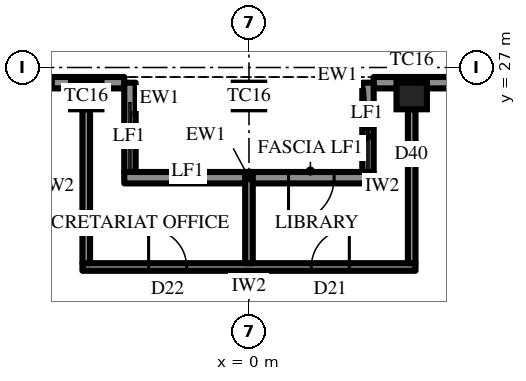
"""IFC4 building model, lengths in metres.
Left out: names, types, materials, properties, quantities, classifications, styles, units other than length and angle.
Written with IfcOpenShell. Run it as: python <this file> out.ifc"""

import sys

from ifc_helpers import new_model, si_unit, direction, frame, frame_2d, origin, origin_2d, place, context, subcontext, project, spatial, rectangle, extrude, element, fill, save


model = new_model("IFC4")
c1 = context("Model", 3, precision=1e-05, world=origin(), true_north=direction((0.0, 1.0)))
c2 = subcontext(c1, "Body", "Model", "MODEL_VIEW")
j1 = project(units=[si_unit("LENGTHUNIT", "METRE"), si_unit("PLANEANGLEUNIT", "RADIAN")], contexts=[c1])
p1 = place(None, origin())
s1 = spatial("IfcSite", under=j1, at=p1, CompositionType="ELEMENT")
p2 = place(p1, origin())
s2 = spatial("IfcBuilding", under=s1, at=p2, CompositionType="ELEMENT")
p3 = place(p2, frame((0.0, 0.0, 378.7)))
s3 = spatial("IfcBuildingStorey", under=s2, at=p3, CompositionType="ELEMENT", Elevation=378.7)
for number, where, z_axis, x_axis in (
    (1, (4.282, 26.25, 0.0), (0.0, 0.0, 1.0), (-1.0, 0.0, 0.0)),
    (2, (0.0, 26.25, 0.0), (0.0, 0.0, 1.0), (-1.0, 0.0, 0.0)),
    (3, (-4.282, 26.25, 0.0), (0.0, 0.0, 1.0), (-1.0, 0.0, 0.0)),
):
    element("IfcColumn", number, at=place(p3, frame(where, z_axis=z_axis, x_axis=x_axis)), inside=s3, PredefinedType="COLUMN", context=c2, shape_type="SweptSolid", body=[
        extrude(rectangle(XDim=0.8, YDim=0.7, at=origin_2d()), origin(), (0.0, 0.0, 1.0), 4.2),
    ])
p4 = place(p3, frame((12.846, 26.6, 0.0), z_axis=(0.0, 0.0, 1.0), x_axis=(-1.0, 0.0, 0.0)))
e4 = element("IfcWall", 4, at=p4, inside=s3, PredefinedType="SOLIDWALL", context=c2, shape_type="SweptSolid", body=[
    extrude(rectangle(XDim=9.564, YDim=0.3, at=frame_2d((4.782, 0.0))), origin(), (0.0, 0.0, 1.0), 2.9),
])
p5 = place(p4, frame((0.866, 0.0, 0.6)))
e5 = element("IfcOpeningElement", 5, at=p5, cuts=e4, PredefinedType="OPENING", context=c2, shape_type="SweptSolid", body=[
    extrude(rectangle(XDim=2.55, YDim=2.05, at=frame_2d((1.275, 1.025))), frame((0.0, 0.16, 0.0), z_axis=(0.0, -1.0, 0.0), x_axis=(1.0, 0.0, 0.0)), (0.0, 0.0, 1.0), 0.32),
])
p6 = place(p4, frame((5.823, 0.0, 0.0)))
e6 = element("IfcOpeningElement", 6, at=p6, cuts=e4, PredefinedType="OPENING", context=c2, shape_type="SweptSolid", body=[
    extrude(rectangle(XDim=1.2, YDim=2.4, at=frame_2d((0.6, 1.2))), frame((0.0, 0.16, 0.0), z_axis=(0.0, -1.0, 0.0), x_axis=(1.0, 0.0, 0.0)), (0.0, 0.0, 1.0), 0.32),
])
p7 = place(p3, frame((-3.282, 26.6, 0.0), z_axis=(0.0, 0.0, 1.0), x_axis=(-1.0, 0.0, 0.0)))
e7 = element("IfcWall", 7, at=p7, inside=s3, PredefinedType="SOLIDWALL", context=c2, shape_type="SweptSolid", body=[
    extrude(rectangle(XDim=9.564, YDim=0.3, at=frame_2d((4.782, 0.0))), origin(), (0.0, 0.0, 1.0), 2.9),
])
p8 = place(p7, frame((1.866, 0.0, 0.6)))
e8 = element("IfcOpeningElement", 8, at=p8, cuts=e7, PredefinedType="OPENING", context=c2, shape_type="SweptSolid", body=[
    extrude(rectangle(XDim=2.55, YDim=2.05, at=frame_2d((1.275, 1.025))), frame((0.0, 0.16, 0.0), z_axis=(0.0, -1.0, 0.0), x_axis=(1.0, 0.0, 0.0)), (0.0, 0.0, 1.0), 0.32),
])
p9 = place(p7, frame((6.148, 0.0, 0.6)))
e9 = element("IfcOpeningElement", 9, at=p9, cuts=e7, PredefinedType="OPENING", context=c2, shape_type="SweptSolid", body=[
    extrude(rectangle(XDim=2.55, YDim=2.05, at=frame_2d((1.275, 1.025))), frame((0.0, 0.16, 0.0), z_axis=(0.0, -1.0, 0.0), x_axis=(1.0, 0.0, 0.0)), (0.0, 0.0, 1.0), 0.32),
])
for number, where, z_axis, x_axis in (
    (10, (3.132, 26.6, 0.0), (0.0, 0.0, 1.0), (0.0, -1.0, 0.0)),
    (11, (-3.132, 26.6, 0.0), (0.0, 0.0, 1.0), (0.0, -1.0, 0.0)),
):
    element("IfcWall", number, at=place(p3, frame(where, z_axis=z_axis, x_axis=x_axis)), inside=s3, PredefinedType="SOLIDWALL", context=c2, shape_type="SweptSolid", body=[
        extrude(rectangle(XDim=2.35, YDim=0.3, at=frame_2d((1.175, 0.0))), origin(), (0.0, 0.0, 1.0), 2.9),
    ])
p10 = place(p3, frame((3.282, 24.1, 0.0), z_axis=(0.0, 0.0, 1.0), x_axis=(-1.0, 0.0, 0.0)))
e12 = element("IfcWall", 12, at=p10, inside=s3, PredefinedType="SOLIDWALL", context=c2, shape_type="SweptSolid", body=[
    extrude(rectangle(XDim=6.564, YDim=0.3, at=frame_2d((3.282, 0.0))), origin(), (0.0, 0.0, 1.0), 2.9),
])
p11 = place(p10, frame((1.041, 0.0, 0.0)))
e13 = element("IfcOpeningElement", 13, at=p11, cuts=e12, PredefinedType="OPENING", context=c2, shape_type="SweptSolid", body=[
    extrude(rectangle(XDim=1.2, YDim=2.4, at=frame_2d((0.6, 1.2))), frame((0.0, 0.16, 0.0), z_axis=(0.0, -1.0, 0.0), x_axis=(1.0, 0.0, 0.0)), (0.0, 0.0, 1.0), 0.32),
])
p12 = place(p3, frame((4.382, 21.75, 0.0), z_axis=(0.0, 0.0, 1.0), x_axis=(-1.0, 0.0, 0.0)))
e14 = element("IfcWall", 14, at=p12, inside=s3, PredefinedType="PARTITIONING", context=c2, shape_type="SweptSolid", body=[
    extrude(rectangle(XDim=8.764, YDim=0.2, at=frame_2d((4.382, 0.0))), origin(), (0.0, 0.0, 1.0), 4.0),
])
p13 = place(p12, frame((1.741, 0.0, 0.0)))
e15 = element("IfcOpeningElement", 15, at=p13, cuts=e14, PredefinedType="OPENING", context=c2, shape_type="SweptSolid", body=[
    extrude(rectangle(XDim=1.0, YDim=2.2, at=frame_2d((0.5, 1.1))), frame((0.0, 0.11, 0.0), z_axis=(0.0, -1.0, 0.0), x_axis=(1.0, 0.0, 0.0)), (0.0, 0.0, 1.0), 0.22),
])
p14 = place(p12, frame((6.023, 0.0, 0.0)))
e16 = element("IfcOpeningElement", 16, at=p14, cuts=e14, PredefinedType="OPENING", context=c2, shape_type="SweptSolid", body=[
    extrude(rectangle(XDim=1.0, YDim=2.2, at=frame_2d((0.5, 1.1))), frame((0.0, 0.11, 0.0), z_axis=(0.0, -1.0, 0.0), x_axis=(1.0, 0.0, 0.0)), (0.0, 0.0, 1.0), 0.22),
])
p15 = place(p3, frame((4.282, 21.85, 0.0), z_axis=(0.0, 0.0, 1.0), x_axis=(0.0, 1.0, 0.0)))
e17 = element("IfcWall", 17, at=p15, inside=s3, PredefinedType="PARTITIONING", context=c2, shape_type="SweptSolid", body=[
    extrude(rectangle(XDim=4.05, YDim=0.2, at=frame_2d((2.025, 0.0))), origin(), (0.0, 0.0, 1.0), 2.992),
])
p16 = place(p3, frame((0.0, 21.85, 0.0), z_axis=(0.0, 0.0, 1.0), x_axis=(0.0, 1.0, 0.0)))
e18 = element("IfcWall", 18, at=p16, inside=s3, PredefinedType="PARTITIONING", context=c2, shape_type="SweptSolid", body=[
    extrude(rectangle(XDim=2.401, YDim=0.2, at=frame_2d((1.2, 0.0))), origin(), (0.0, 0.0, 1.0), 2.992),
])
p17 = place(p3, frame((-4.282, 21.85, 0.0), z_axis=(0.0, 0.0, 1.0), x_axis=(0.0, 1.0, 0.0)))
e19 = element("IfcWall", 19, at=p17, inside=s3, PredefinedType="PARTITIONING", context=c2, shape_type="SweptSolid", body=[
    extrude(rectangle(XDim=4.05, YDim=0.2, at=frame_2d((2.025, 0.0))), origin(), (0.0, 0.0, 1.0), 2.992),
])
p18 = place(p8, origin())
e20 = element("IfcWindow", 20, at=p18, inside=s3, PartitioningType="SINGLE_PANEL", PredefinedType="WINDOW", context=c2, shape_type="SweptSolid", body=[
    extrude(rectangle(XDim=2.55, YDim=2.05, at=frame_2d((1.275, 1.025))), frame((0.0, 0.03, 0.0), z_axis=(0.0, -1.0, 0.0), x_axis=(1.0, 0.0, 0.0)), (0.0, 0.0, 1.0), 0.06),
])
fill(e8, e20)
p19 = place(p11, origin())
e21 = element("IfcDoor", 21, at=p19, inside=s3, OperationType="SINGLE_SWING_LEFT", PredefinedType="DOOR", context=c2, shape_type="SweptSolid", body=[
    extrude(rectangle(XDim=1.2, YDim=2.4, at=frame_2d((0.6, 1.2))), frame((0.0, 0.025, 0.0), z_axis=(0.0, -1.0, 0.0), x_axis=(1.0, 0.0, 0.0)), (0.0, 0.0, 1.0), 0.05),
])
fill(e13, e21)
p20 = place(p13, frame((1.0, 0.0, 0.0), z_axis=(0.0, 0.0, 1.0), x_axis=(-1.0, 0.0, 0.0)))
e22 = element("IfcDoor", 22, at=p20, inside=s3, OperationType="SINGLE_SWING_LEFT", PredefinedType="DOOR", context=c2, shape_type="SweptSolid", body=[
    extrude(rectangle(XDim=1.0, YDim=2.2, at=frame_2d((0.5, 1.1))), frame((0.0, 0.025, 0.0), z_axis=(0.0, -1.0, 0.0), x_axis=(1.0, 0.0, 0.0)), (0.0, 0.0, 1.0), 0.05),
])
fill(e15, e22)
p21 = place(p14, frame((1.0, 0.0, 0.0), z_axis=(0.0, 0.0, 1.0), x_axis=(-1.0, 0.0, 0.0)))
e23 = element("IfcDoor", 23, at=p21, inside=s3, OperationType="SINGLE_SWING_RIGHT", PredefinedType="DOOR", context=c2, shape_type="SweptSolid", body=[
    extrude(rectangle(XDim=1.0, YDim=2.2, at=frame_2d((0.5, 1.1))), frame((0.0, 0.025, 0.0), z_axis=(0.0, -1.0, 0.0), x_axis=(1.0, 0.0, 0.0)), (0.0, 0.0, 1.0), 0.05),
])
fill(e16, e23)
save(model, sys.argv[1])
